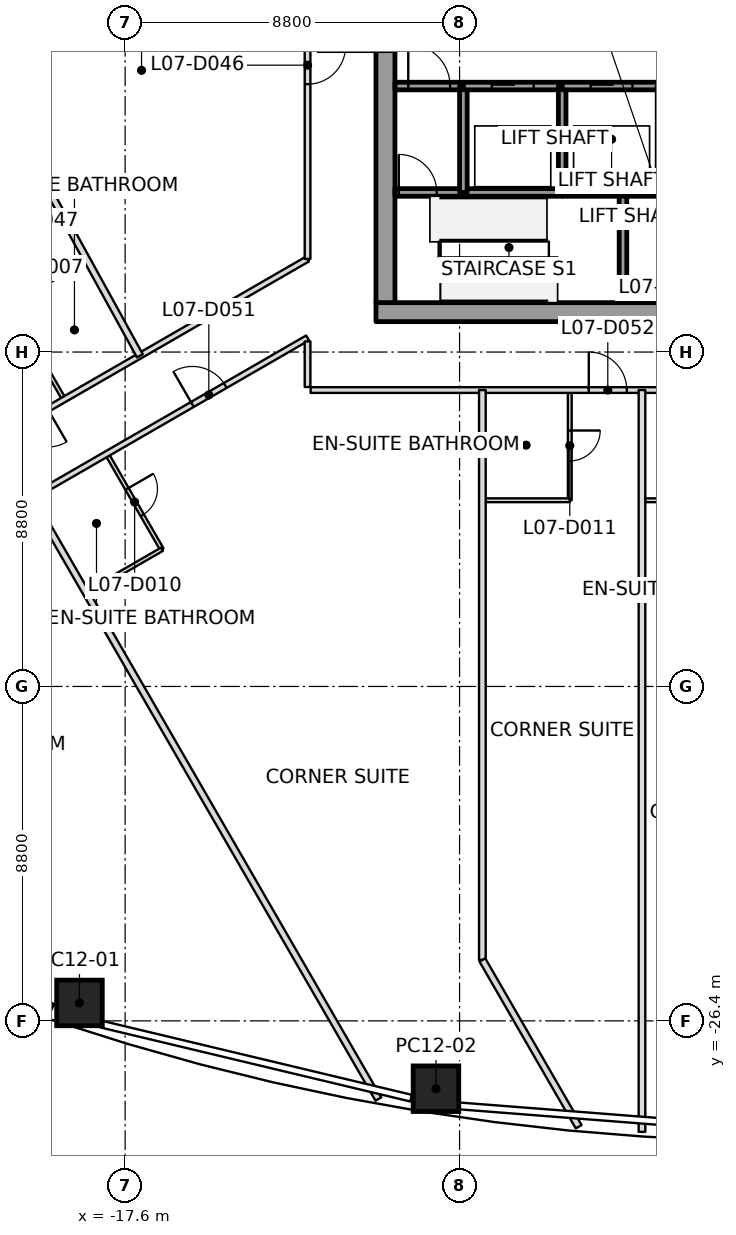
"""IFC4 building model, lengths in metres.
Left out: names, types, materials, properties, quantities, classifications, styles, units other than length and angle.
Written with IfcOpenShell. Run it as: python <this file> out.ifc"""

import sys

from ifc_helpers import new_model, si_unit, direction, frame, frame_2d, origin, origin_2d, place, context, subcontext, project, spatial, rectangle, extrude, clip, halfspace, element, fill, save


model = new_model("IFC4")
c1 = context("Model", 3, precision=1e-05, world=origin(), true_north=direction((0.0, 1.0)))
c2 = subcontext(c1, "Body", "Model", "MODEL_VIEW")
j1 = project(units=[si_unit("LENGTHUNIT", "METRE"), si_unit("PLANEANGLEUNIT", "RADIAN")], contexts=[c1])
p1 = place(None, origin())
s1 = spatial("IfcSite", under=j1, at=p1, CompositionType="ELEMENT")
p2 = place(p1, origin())
s2 = spatial("IfcBuilding", under=s1, at=p2, CompositionType="ELEMENT")
p3 = place(p2, frame((0.0, 0.0, 48.0)))
s3 = spatial("IfcBuildingStorey", under=s2, at=p3, CompositionType="ELEMENT", Elevation=48.0)
p4 = place(p3, frame((-18.802, -25.928, 0.0), z_axis=(0.019020345186, 0.17825893475, 0.983799765527), x_axis=(-0.950332394894, 0.308956292564, -0.037607824987)))
e1 = element("IfcColumn", 1, at=p4, inside=s3, PredefinedType="COLUMN", context=c2, shape_type="SweptSolid", body=[
    clip(clip(extrude(rectangle(XDim=1.2, YDim=1.2, at=origin_2d()), origin(), (0.0, 0.0, 1.0), 3.761), halfspace(frame((0.0, 0.0, 0.008)), True)), halfspace(frame((0.0, 0.0, 3.76)), False)),
])
p5 = place(p3, frame((-9.421, -28.186, 0.0), z_axis=(0.00938738074, 0.224525572229, 0.97442298028), x_axis=(0.980605744382, -0.192842524507, 0.034987638199)))
e2 = element("IfcColumn", 2, at=p5, inside=s3, PredefinedType="COLUMN", context=c2, shape_type="SweptSolid", body=[
    clip(extrude(rectangle(XDim=1.2, YDim=1.2, at=origin_2d()), origin(), (0.0, 0.0, 1.0), 3.797), halfspace(frame((0.0, 0.0, 0.008)), True)),
])
p6 = place(p3, frame((-11.0, -7.75, 0.0), z_axis=(0.0, 0.0, 1.0), x_axis=(1.0, 0.0, 0.0)))
e3 = element("IfcWall", 3, at=p6, inside=s3, PredefinedType="SHEAR", context=c2, shape_type="SweptSolid", body=[
    extrude(rectangle(XDim=22.0, YDim=0.5, at=frame_2d((11.0, 0.0))), origin(), (0.0, 0.0, 1.0), 3.7),
])
p7 = place(p6, frame((10.45, 0.0, 0.0)))
e4 = element("IfcOpeningElement", 4, at=p7, cuts=e3, PredefinedType="OPENING", context=c2, shape_type="SweptSolid", body=[
    extrude(rectangle(XDim=1.1, YDim=2.1, at=frame_2d((0.55, 1.05))), frame((0.0, 0.25, 0.0), z_axis=(0.0, -1.0, 0.0), x_axis=(1.0, 0.0, 0.0)), (0.0, 0.0, 1.0), 0.5),
])
p8 = place(p3, frame((-10.75, -7.5, 0.0), z_axis=(0.0, 0.0, 1.0), x_axis=(0.0, 1.0, 0.0)))
e5 = element("IfcWall", 5, at=p8, inside=s3, PredefinedType="SHEAR", context=c2, shape_type="SweptSolid", body=[
    extrude(rectangle(XDim=15.0, YDim=0.5, at=frame_2d((7.5, 0.0))), origin(), (0.0, 0.0, 1.0), 3.7),
])
p9 = place(p8, frame((6.6, 0.0, 0.0)))
e6 = element("IfcOpeningElement", 6, at=p9, cuts=e5, PredefinedType="OPENING", context=c2, shape_type="SweptSolid", body=[
    extrude(rectangle(XDim=1.8, YDim=2.1, at=frame_2d((0.9, 1.05))), frame((0.0, 0.25, 0.0), z_axis=(0.0, -1.0, 0.0), x_axis=(1.0, 0.0, 0.0)), (0.0, 0.0, 1.0), 0.5),
])
p10 = place(p3, frame((-10.5, -4.6, 0.0), z_axis=(0.0, 0.0, 1.0), x_axis=(1.0, 0.0, 0.0)))
e7 = element("IfcWall", 7, at=p10, inside=s3, PredefinedType="SOLIDWALL", context=c2, shape_type="SweptSolid", body=[
    extrude(rectangle(XDim=1.8, YDim=0.2, at=frame_2d((0.9, 0.0))), origin(), (0.0, 0.0, 1.0), 3.55),
])
p11 = place(p10, frame((0.1, 0.0, 0.0)))
e8 = element("IfcOpeningElement", 8, at=p11, cuts=e7, PredefinedType="OPENING", context=c2, shape_type="SweptSolid", body=[
    extrude(rectangle(XDim=1.0, YDim=2.1, at=frame_2d((0.5, 1.05))), frame((0.0, 0.1, 0.0), z_axis=(0.0, -1.0, 0.0), x_axis=(1.0, 0.0, 0.0)), (0.0, 0.0, 1.0), 0.2),
])
p12 = place(p3, frame((-10.5, -1.8, 0.0), z_axis=(0.0, 0.0, 1.0), x_axis=(1.0, 0.0, 0.0)))
e9 = element("IfcWall", 9, at=p12, inside=s3, PredefinedType="SOLIDWALL", context=c2, shape_type="SweptSolid", body=[
    extrude(rectangle(XDim=1.8, YDim=0.2, at=frame_2d((0.9, 0.0))), origin(), (0.0, 0.0, 1.0), 3.55),
])
p13 = place(p12, frame((0.35, 0.0, 0.0)))
e10 = element("IfcOpeningElement", 10, at=p13, cuts=e9, PredefinedType="OPENING", context=c2, shape_type="SweptSolid", body=[
    extrude(rectangle(XDim=1.1, YDim=2.1, at=frame_2d((0.55, 1.05))), frame((0.0, 0.1, 0.0), z_axis=(0.0, -1.0, 0.0), x_axis=(1.0, 0.0, 0.0)), (0.0, 0.0, 1.0), 0.2),
])
p14 = place(p3, frame((-8.7, -4.6, 0.0), z_axis=(0.0, 0.0, 1.0), x_axis=(1.0, 0.0, 0.0)))
e11 = element("IfcWall", 11, at=p14, inside=s3, PredefinedType="SOLIDWALL", context=c2, shape_type="SweptSolid", body=[
    extrude(rectangle(XDim=2.6, YDim=0.2, at=frame_2d((1.3, 0.0))), origin(), (0.0, 0.0, 1.0), 3.55),
])
p15 = place(p3, frame((-8.7, -4.6, 0.0), z_axis=(0.0, 0.0, 1.0), x_axis=(0.0, 1.0, 0.0)))
e12 = element("IfcWall", 12, at=p15, inside=s3, PredefinedType="SOLIDWALL", context=c2, shape_type="SweptSolid", body=[
    extrude(rectangle(XDim=2.8, YDim=0.2, at=frame_2d((1.4, 0.0))), origin(), (0.0, 0.0, 1.0), 3.55),
])
p16 = place(p3, frame((-8.7, -1.8, 0.0), z_axis=(0.0, 0.0, 1.0), x_axis=(1.0, 0.0, 0.0)))
e13 = element("IfcWall", 13, at=p16, inside=s3, PredefinedType="SOLIDWALL", context=c2, shape_type="SweptSolid", body=[
    extrude(rectangle(XDim=2.6, YDim=0.2, at=frame_2d((1.3, 0.0))), origin(), (0.0, 0.0, 1.0), 3.55),
])
p17 = place(p16, frame((0.75, 0.0, 0.0)))
e14 = element("IfcOpeningElement", 14, at=p17, cuts=e13, PredefinedType="OPENING", context=c2, shape_type="SweptSolid", body=[
    extrude(rectangle(XDim=1.1, YDim=2.1, at=frame_2d((0.55, 1.05))), frame((0.0, 0.1, 0.0), z_axis=(0.0, -1.0, 0.0), x_axis=(1.0, 0.0, 0.0)), (0.0, 0.0, 1.0), 0.2),
])
p18 = place(p3, frame((-6.1, -4.6, 0.0), z_axis=(0.0, 0.0, 1.0), x_axis=(1.0, 0.0, 0.0)))
e15 = element("IfcWall", 15, at=p18, inside=s3, PredefinedType="SOLIDWALL", context=c2, shape_type="SweptSolid", body=[
    extrude(rectangle(XDim=1.6, YDim=0.2, at=frame_2d((0.8, 0.0))), origin(), (0.0, 0.0, 1.0), 3.55),
])
p19 = place(p3, frame((-6.1, -4.6, 0.0), z_axis=(0.0, 0.0, 1.0), x_axis=(0.0, 1.0, 0.0)))
e16 = element("IfcWall", 16, at=p19, inside=s3, PredefinedType="SOLIDWALL", context=c2, shape_type="SweptSolid", body=[
    extrude(rectangle(XDim=2.8, YDim=0.2, at=frame_2d((1.4, 0.0))), origin(), (0.0, 0.0, 1.0), 3.55),
])
p20 = place(p3, frame((-6.1, -1.8, 0.0), z_axis=(0.0, 0.0, 1.0), x_axis=(1.0, 0.0, 0.0)))
e17 = element("IfcWall", 17, at=p20, inside=s3, PredefinedType="SOLIDWALL", context=c2, shape_type="SweptSolid", body=[
    extrude(rectangle(XDim=2.6, YDim=0.2, at=frame_2d((1.3, 0.0))), origin(), (0.0, 0.0, 1.0), 3.55),
])
p21 = place(p20, frame((0.75, 0.0, 0.0)))
e18 = element("IfcOpeningElement", 18, at=p21, cuts=e17, PredefinedType="OPENING", context=c2, shape_type="SweptSolid", body=[
    extrude(rectangle(XDim=1.1, YDim=2.1, at=frame_2d((0.55, 1.05))), frame((0.0, 0.1, 0.0), z_axis=(0.0, -1.0, 0.0), x_axis=(1.0, 0.0, 0.0)), (0.0, 0.0, 1.0), 0.2),
])
p22 = place(p3, frame((-4.5, -4.6, 0.0), z_axis=(0.0, 0.0, 1.0), x_axis=(0.0, -1.0, 0.0)))
e19 = element("IfcWall", 19, at=p22, inside=s3, PredefinedType="SOLIDWALL", context=c2, shape_type="SweptSolid", body=[
    extrude(rectangle(XDim=2.9, YDim=0.2, at=frame_2d((1.45, 0.0))), origin(), (0.0, 0.0, 1.0), 3.55),
])
p23 = place(p3, frame((-4.5, -4.6, 0.0), z_axis=(0.0, 0.0, 1.0), x_axis=(1.0, 0.0, 0.0)))
e20 = element("IfcWall", 20, at=p23, inside=s3, PredefinedType="SOLIDWALL", context=c2, shape_type="SweptSolid", body=[
    extrude(rectangle(XDim=1.0, YDim=0.2, at=frame_2d((0.5, 0.0))), origin(), (0.0, 0.0, 1.0), 3.55),
])
p24 = place(p3, frame((-17.213, -8.899, 0.0), z_axis=(0.0, 0.0, 1.0), x_axis=(-0.482265023756, 0.876025368846, 0.0)))
e21 = element("IfcWall", 21, at=p24, inside=s3, PredefinedType="PARTITIONING", context=c2, shape_type="SweptSolid", body=[
    extrude(rectangle(XDim=14.424, YDim=0.175, at=frame_2d((7.212, 0.0))), origin(), (0.0, 0.0, 1.0), 2.947),
])
p25 = place(p3, frame((-20.075, -12.629, 0.0), z_axis=(0.0, 0.0, 1.0), x_axis=(0.500000727794, -0.866024983592, 0.0)))
e22 = element("IfcWall", 22, at=p25, inside=s3, PredefinedType="PARTITIONING", context=c2, shape_type="SweptSolid", body=[
    extrude(rectangle(XDim=18.277, YDim=0.175, at=frame_2d((9.139, 0.0))), origin(), (0.0, 0.0, 1.0), 2.797),
])
p26 = place(p3, frame((-8.2, -9.8, 0.0), z_axis=(0.0, 0.0, 1.0), x_axis=(0.0, -1.0, 0.0)))
e23 = element("IfcWall", 23, at=p26, inside=s3, PredefinedType="PARTITIONING", context=c2, shape_type="SweptSolid", body=[
    extrude(rectangle(XDim=14.997, YDim=0.175, at=frame_2d((7.498, 0.0))), origin(), (0.0, 0.0, 1.0), 3.15),
])
p27 = place(p3, frame((-8.2, -24.797, 0.0), z_axis=(0.0, 0.0, 1.0), x_axis=(0.499987891935, -0.866032394266, 0.0)))
e24 = element("IfcWall", 24, at=p27, inside=s3, PredefinedType="PARTITIONING", context=c2, shape_type="SweptSolid", body=[
    extrude(rectangle(XDim=5.069, YDim=0.175, at=frame_2d((2.535, 0.0))), origin(), (0.0, 0.0, 1.0), 2.934),
])
p28 = place(p3, frame((-4.0, -9.8, 0.0), z_axis=(0.0, 0.0, 1.0), x_axis=(0.0, -1.0, 0.0)))
e25 = element("IfcWall", 25, at=p28, inside=s3, PredefinedType="PARTITIONING", context=c2, shape_type="SweptSolid", body=[
    extrude(rectangle(XDim=19.521, YDim=0.175, at=frame_2d((9.761, 0.0))), origin(), (0.0, 0.0, 1.0), 2.934),
])
p29 = place(p3, frame((-12.8, -6.351, 0.0), z_axis=(0.0, 0.0, 1.0), x_axis=(-0.866024715125, -0.500001192792, 0.0)))
e26 = element("IfcWall", 26, at=p29, inside=s3, PredefinedType="PARTITIONING", context=c2, shape_type="SweptSolid", body=[
    extrude(rectangle(XDim=13.496, YDim=0.15, at=frame_2d((6.748, 0.0))), origin(), (0.0, 0.0, 1.0), 2.947),
])
p30 = place(p29, frame((7.896, 0.0, 0.0)))
e27 = element("IfcOpeningElement", 27, at=p30, cuts=e26, PredefinedType="OPENING", context=c2, shape_type="SweptSolid", body=[
    extrude(rectangle(XDim=1.0, YDim=2.1, at=frame_2d((0.5, 1.05))), frame((0.0, 0.075, 0.0), z_axis=(0.0, -1.0, 0.0), x_axis=(1.0, 0.0, 0.0)), (0.0, 0.0, 1.0), 0.15),
])
p31 = place(p29, frame((12.095, 0.0, 0.0)))
e28 = element("IfcOpeningElement", 28, at=p31, cuts=e26, PredefinedType="OPENING", context=c2, shape_type="SweptSolid", body=[
    extrude(rectangle(XDim=1.0, YDim=2.1, at=frame_2d((0.5, 1.05))), frame((0.0, 0.075, 0.0), z_axis=(0.0, -1.0, 0.0), x_axis=(1.0, 0.0, 0.0)), (0.0, 0.0, 1.0), 0.15),
])
p32 = place(p3, frame((-23.518, -14.617, 0.0), z_axis=(0.0, 0.0, 1.0), x_axis=(0.866023964651, 0.500002492643, 0.0)))
e29 = element("IfcWall", 29, at=p32, inside=s3, PredefinedType="PARTITIONING", context=c2, shape_type="SweptSolid", body=[
    extrude(rectangle(XDim=12.376, YDim=0.15, at=frame_2d((6.188, 0.0))), origin(), (0.0, 0.0, 1.0), 2.797),
])
p33 = place(p32, frame((2.638, 0.0, 0.0)))
e30 = element("IfcOpeningElement", 30, at=p33, cuts=e29, PredefinedType="OPENING", context=c2, shape_type="SweptSolid", body=[
    extrude(rectangle(XDim=1.0, YDim=2.1, at=frame_2d((0.5, 1.05))), frame((0.0, 0.075, 0.0), z_axis=(0.0, -1.0, 0.0), x_axis=(1.0, 0.0, 0.0)), (0.0, 0.0, 1.0), 0.15),
])
p34 = place(p32, frame((8.876, 0.0, 0.0)))
e31 = element("IfcOpeningElement", 31, at=p34, cuts=e29, PredefinedType="OPENING", context=c2, shape_type="SweptSolid", body=[
    extrude(rectangle(XDim=1.0, YDim=2.1, at=frame_2d((0.5, 1.05))), frame((0.0, 0.075, 0.0), z_axis=(0.0, -1.0, 0.0), x_axis=(1.0, 0.0, 0.0)), (0.0, 0.0, 1.0), 0.15),
])
p35 = place(p3, frame((-12.8, -8.521, 0.0), z_axis=(0.0, 0.0, 1.0), x_axis=(0.0, -1.0, 0.0)))
e32 = element("IfcWall", 32, at=p35, inside=s3, PredefinedType="PARTITIONING", context=c2, shape_type="SweptSolid", body=[
    extrude(rectangle(XDim=1.199, YDim=0.15, at=frame_2d((0.6, 0.0))), origin(), (0.0, 0.0, 1.0), 2.797),
])
p36 = place(p3, frame((-12.8, 9.72, 0.0), z_axis=(0.0, 0.0, 1.0), x_axis=(0.0, -1.0, 0.0)))
e33 = element("IfcWall", 33, at=p36, inside=s3, PredefinedType="PARTITIONING", context=c2, shape_type="SweptSolid", body=[
    extrude(rectangle(XDim=16.071, YDim=0.15, at=frame_2d((8.035, 0.0))), origin(), (0.0, 0.0, 1.0), 3.017),
])
p37 = place(p36, frame((1.195, 0.0, 0.0)))
e34 = element("IfcOpeningElement", 34, at=p37, cuts=e33, PredefinedType="OPENING", context=c2, shape_type="SweptSolid", body=[
    extrude(rectangle(XDim=1.0, YDim=2.1, at=frame_2d((0.5, 1.05))), frame((0.0, 0.075, 0.0), z_axis=(0.0, -1.0, 0.0), x_axis=(1.0, 0.0, 0.0)), (0.0, 0.0, 1.0), 0.15),
])
p38 = place(p36, frame((10.471, 0.0, 0.0)))
e35 = element("IfcOpeningElement", 35, at=p38, cuts=e33, PredefinedType="OPENING", context=c2, shape_type="SweptSolid", body=[
    extrude(rectangle(XDim=1.0, YDim=2.1, at=frame_2d((0.5, 1.05))), frame((0.0, 0.075, 0.0), z_axis=(0.0, -1.0, 0.0), x_axis=(1.0, 0.0, 0.0)), (0.0, 0.0, 1.0), 0.15),
])
p39 = place(p3, frame((-12.72, -9.8, 0.0), z_axis=(0.0, 0.0, 1.0), x_axis=(1.0, 0.0, 0.0)))
e36 = element("IfcWall", 36, at=p39, inside=s3, PredefinedType="PARTITIONING", context=c2, shape_type="SweptSolid", body=[
    extrude(rectangle(XDim=25.44, YDim=0.15, at=frame_2d((12.72, 0.0))), origin(), (0.0, 0.0, 1.0), 2.947),
])
p40 = place(p39, frame((7.32, 0.0, 0.0)))
e37 = element("IfcOpeningElement", 37, at=p40, cuts=e36, PredefinedType="OPENING", context=c2, shape_type="SweptSolid", body=[
    extrude(rectangle(XDim=1.0, YDim=2.1, at=frame_2d((0.5, 1.05))), frame((0.0, 0.075, 0.0), z_axis=(0.0, -1.0, 0.0), x_axis=(1.0, 0.0, 0.0)), (0.0, 0.0, 1.0), 0.15),
])
p41 = place(p39, frame((11.52, 0.0, 0.0)))
e38 = element("IfcOpeningElement", 38, at=p41, cuts=e36, PredefinedType="OPENING", context=c2, shape_type="SweptSolid", body=[
    extrude(rectangle(XDim=1.0, YDim=2.1, at=frame_2d((0.5, 1.05))), frame((0.0, 0.075, 0.0), z_axis=(0.0, -1.0, 0.0), x_axis=(1.0, 0.0, 0.0)), (0.0, 0.0, 1.0), 0.15),
])
p42 = place(p39, frame((15.72, 0.0, 0.0)))
e39 = element("IfcOpeningElement", 39, at=p42, cuts=e36, PredefinedType="OPENING", context=c2, shape_type="SweptSolid", body=[
    extrude(rectangle(XDim=1.0, YDim=2.1, at=frame_2d((0.5, 1.05))), frame((0.0, 0.075, 0.0), z_axis=(0.0, -1.0, 0.0), x_axis=(1.0, 0.0, 0.0)), (0.0, 0.0, 1.0), 0.15),
])
p43 = place(p39, frame((19.92, 0.0, 0.0)))
e40 = element("IfcOpeningElement", 40, at=p43, cuts=e36, PredefinedType="OPENING", context=c2, shape_type="SweptSolid", body=[
    extrude(rectangle(XDim=1.0, YDim=2.1, at=frame_2d((0.5, 1.05))), frame((0.0, 0.075, 0.0), z_axis=(0.0, -1.0, 0.0), x_axis=(1.0, 0.0, 0.0)), (0.0, 0.0, 1.0), 0.15),
])
p44 = place(p3, frame((-19.22, -10.023, 0.0), z_axis=(0.0, 0.0, 1.0), x_axis=(-0.499999802827, 0.866025517622, 0.0)))
e41 = element("IfcWall", 41, at=p44, inside=s3, PredefinedType="PARTITIONING", context=c2, shape_type="SweptSolid", body=[
    extrude(rectangle(XDim=2.87, YDim=0.1, at=frame_2d((1.435, 0.0))), origin(), (0.0, 0.0, 1.0), 3.15),
])
p45 = place(p44, frame((1.035, 0.0, 0.0)))
e42 = element("IfcOpeningElement", 42, at=p45, cuts=e41, PredefinedType="OPENING", context=c2, shape_type="SweptSolid", body=[
    extrude(rectangle(XDim=0.8, YDim=2.1, at=frame_2d((0.4, 1.05))), frame((0.0, 0.05, 0.0), z_axis=(0.0, -1.0, 0.0), x_axis=(1.0, 0.0, 0.0)), (0.0, 0.0, 1.0), 0.1),
])
p46 = place(p3, frame((-20.655, -7.537, 0.0), z_axis=(0.0, 0.0, 1.0), x_axis=(0.866017224141, 0.500014167291, 0.0)))
e43 = element("IfcWall", 43, at=p46, inside=s3, PredefinedType="PARTITIONING", context=c2, shape_type="SweptSolid", body=[
    extrude(rectangle(XDim=2.27, YDim=0.1, at=frame_2d((1.135, 0.0))), origin(), (0.0, 0.0, 1.0), 2.947),
])
p47 = place(p3, frame((-18.068, -11.505, 0.0), z_axis=(0.0, 0.0, 1.0), x_axis=(0.500036638401, -0.866004249561, 0.0)))
e44 = element("IfcWall", 44, at=p47, inside=s3, PredefinedType="PARTITIONING", context=c2, shape_type="SweptSolid", body=[
    extrude(rectangle(XDim=2.87, YDim=0.1, at=frame_2d((1.435, 0.0))), origin(), (0.0, 0.0, 1.0), 2.797),
])
p48 = place(p47, frame((1.035, 0.0, 0.0)))
e45 = element("IfcOpeningElement", 45, at=p48, cuts=e44, PredefinedType="OPENING", context=c2, shape_type="SweptSolid", body=[
    extrude(rectangle(XDim=0.8, YDim=2.1, at=frame_2d((0.4, 1.05))), frame((0.0, 0.05, 0.0), z_axis=(0.0, -1.0, 0.0), x_axis=(1.0, 0.0, 0.0)), (0.0, 0.0, 1.0), 0.1),
])
p49 = place(p3, frame((-16.633, -13.991, 0.0), z_axis=(0.0, 0.0, 1.0), x_axis=(-0.866017224141, -0.500014167291, 0.0)))
e46 = element("IfcWall", 46, at=p49, inside=s3, PredefinedType="PARTITIONING", context=c2, shape_type="SweptSolid", body=[
    extrude(rectangle(XDim=2.27, YDim=0.1, at=frame_2d((1.135, 0.0))), origin(), (0.0, 0.0, 1.0), 3.15),
])
p50 = place(p3, frame((-5.9, -9.83, 0.0), z_axis=(0.0, 0.0, 1.0), x_axis=(0.0, -1.0, 0.0)))
e47 = element("IfcWall", 47, at=p50, inside=s3, PredefinedType="PARTITIONING", context=c2, shape_type="SweptSolid", body=[
    extrude(rectangle(XDim=2.87, YDim=0.1, at=frame_2d((1.435, 0.0))), origin(), (0.0, 0.0, 1.0), 3.15),
])
p51 = place(p50, frame((1.035, 0.0, 0.0)))
e48 = element("IfcOpeningElement", 48, at=p51, cuts=e47, PredefinedType="OPENING", context=c2, shape_type="SweptSolid", body=[
    extrude(rectangle(XDim=0.8, YDim=2.1, at=frame_2d((0.4, 1.05))), frame((0.0, 0.05, 0.0), z_axis=(0.0, -1.0, 0.0), x_axis=(1.0, 0.0, 0.0)), (0.0, 0.0, 1.0), 0.1),
])
for number, where, z_axis, x_axis in (
    (49, (-5.9, -12.7, 0.0), (0.0, 0.0, 1.0), (-1.0, 0.0, 0.0)),
    (50, (-1.7, -12.7, 0.0), (0.0, 0.0, 1.0), (-1.0, 0.0, 0.0)),
):
    element("IfcWall", number, at=place(p3, frame(where, z_axis=z_axis, x_axis=x_axis)), inside=s3, PredefinedType="PARTITIONING", context=c2, shape_type="SweptSolid", body=[
        extrude(rectangle(XDim=2.27, YDim=0.1, at=frame_2d((1.135, 0.0))), origin(), (0.0, 0.0, 1.0), 2.947),
    ])
p52 = place(p38, origin())
e51 = element("IfcDoor", 51, at=p52, inside=s3, OperationType="SINGLE_SWING_RIGHT", PredefinedType="DOOR", context=c2, shape_type="SweptSolid", body=[
    extrude(rectangle(XDim=1.0, YDim=2.1, at=frame_2d((0.5, 1.05))), frame((0.0, 0.025, 0.0), z_axis=(0.0, -1.0, 0.0), x_axis=(1.0, 0.0, 0.0)), (0.0, 0.0, 1.0), 0.05),
])
fill(e35, e51)
p53 = place(p34, origin())
e52 = element("IfcDoor", 52, at=p53, inside=s3, OperationType="SINGLE_SWING_LEFT", PredefinedType="DOOR", context=c2, shape_type="SweptSolid", body=[
    extrude(rectangle(XDim=1.0, YDim=2.1, at=frame_2d((0.5, 1.05))), frame((0.0, 0.025, 0.0), z_axis=(0.0, -1.0, 0.0), x_axis=(1.0, 0.0, 0.0)), (0.0, 0.0, 1.0), 0.05),
])
fill(e31, e52)
p54 = place(p48, origin())
e53 = element("IfcDoor", 53, at=p54, inside=s3, OperationType="SINGLE_SWING_LEFT", PredefinedType="DOOR", context=c2, shape_type="SweptSolid", body=[
    extrude(rectangle(XDim=0.8, YDim=2.1, at=frame_2d((0.4, 1.05))), frame((0.0, 0.025, 0.0), z_axis=(0.0, -1.0, 0.0), x_axis=(1.0, 0.0, 0.0)), (0.0, 0.0, 1.0), 0.05),
])
fill(e45, e53)
p55 = place(p40, origin())
e54 = element("IfcDoor", 54, at=p55, inside=s3, OperationType="SINGLE_SWING_LEFT", PredefinedType="DOOR", context=c2, shape_type="SweptSolid", body=[
    extrude(rectangle(XDim=1.0, YDim=2.1, at=frame_2d((0.5, 1.05))), frame((0.0, 0.025, 0.0), z_axis=(0.0, -1.0, 0.0), x_axis=(1.0, 0.0, 0.0)), (0.0, 0.0, 1.0), 0.05),
])
fill(e37, e54)
p56 = place(p51, origin())
e55 = element("IfcDoor", 55, at=p56, inside=s3, OperationType="SINGLE_SWING_LEFT", PredefinedType="DOOR", context=c2, shape_type="SweptSolid", body=[
    extrude(rectangle(XDim=0.8, YDim=2.1, at=frame_2d((0.4, 1.05))), frame((0.0, 0.025, 0.0), z_axis=(0.0, -1.0, 0.0), x_axis=(1.0, 0.0, 0.0)), (0.0, 0.0, 1.0), 0.05),
])
fill(e48, e55)
p57 = place(p17, origin())
e56 = element("IfcDoor", 56, at=p57, inside=s3, OperationType="SLIDING_TO_LEFT", PredefinedType="DOOR", context=c2, shape_type="SweptSolid", body=[
    extrude(rectangle(XDim=1.1, YDim=2.1, at=frame_2d((0.55, 1.05))), frame((0.0, 0.025, 0.0), z_axis=(0.0, -1.0, 0.0), x_axis=(1.0, 0.0, 0.0)), (0.0, 0.0, 1.0), 0.05),
])
fill(e14, e56)
p58 = place(p21, origin())
e57 = element("IfcDoor", 57, at=p58, inside=s3, OperationType="SLIDING_TO_RIGHT", PredefinedType="DOOR", context=c2, shape_type="SweptSolid", body=[
    extrude(rectangle(XDim=1.1, YDim=2.1, at=frame_2d((0.55, 1.05))), frame((0.0, 0.025, 0.0), z_axis=(0.0, -1.0, 0.0), x_axis=(1.0, 0.0, 0.0)), (0.0, 0.0, 1.0), 0.05),
])
fill(e18, e57)
p59 = place(p13, origin())
e58 = element("IfcDoor", 58, at=p59, inside=s3, OperationType="SINGLE_SWING_LEFT", PredefinedType="DOOR", context=c2, shape_type="SweptSolid", body=[
    extrude(rectangle(XDim=1.1, YDim=2.1, at=frame_2d((0.55, 1.05))), frame((0.0, 0.025, 0.0), z_axis=(0.0, -1.0, 0.0), x_axis=(1.0, 0.0, 0.0)), (0.0, 0.0, 1.0), 0.05),
])
fill(e10, e58)
p60 = place(p11, origin())
e59 = element("IfcDoor", 59, at=p60, inside=s3, OperationType="SINGLE_SWING_LEFT", PredefinedType="DOOR", context=c2, shape_type="SweptSolid", body=[
    extrude(rectangle(XDim=1.0, YDim=2.1, at=frame_2d((0.5, 1.05))), frame((0.0, 0.025, 0.0), z_axis=(0.0, -1.0, 0.0), x_axis=(1.0, 0.0, 0.0)), (0.0, 0.0, 1.0), 0.05),
])
fill(e8, e59)
p61 = place(p9, origin())
e60 = element("IfcDoor", 60, at=p61, inside=s3, OperationType="DOUBLE_DOOR_SINGLE_SWING", PredefinedType="DOOR", context=c2, shape_type="SweptSolid", body=[
    extrude(rectangle(XDim=1.8, YDim=2.1, at=frame_2d((0.9, 1.05))), frame((0.0, 0.025, 0.0), z_axis=(0.0, -1.0, 0.0), x_axis=(1.0, 0.0, 0.0)), (0.0, 0.0, 1.0), 0.05),
])
fill(e6, e60)
save(model, sys.argv[1])
